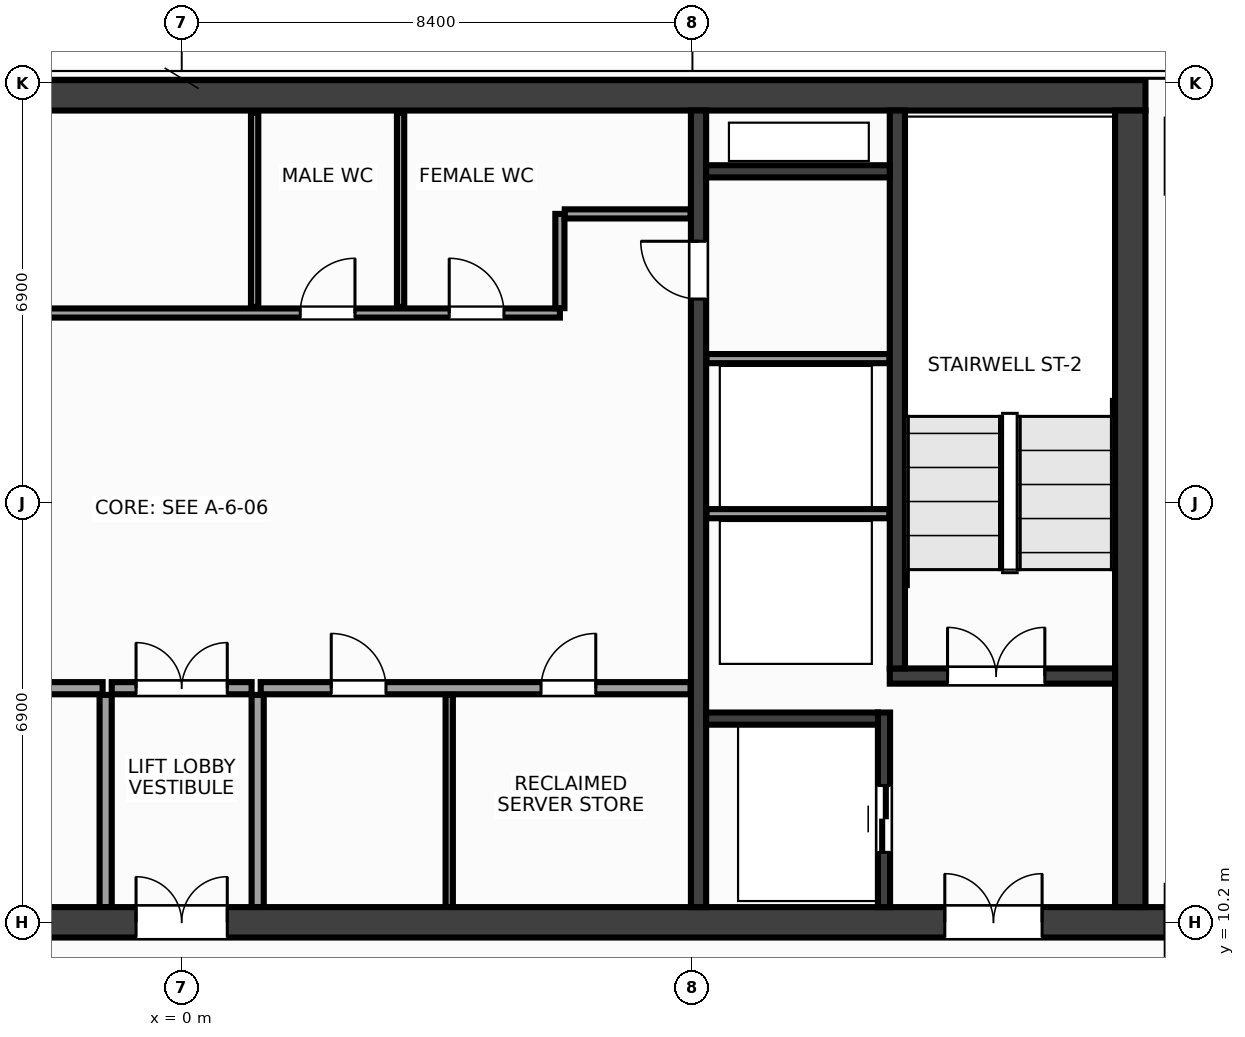
"""IFC4 building model, lengths in metres.
Left out: names, types, materials, properties, quantities, classifications, styles, units other than length and angle.
Written with IfcOpenShell. Run it as: python <this file> out.ifc"""

import sys

from ifc_helpers import new_model, si_unit, direction, frame, frame_2d, origin, place, context, subcontext, project, spatial, rectangle, extrude, source, transform, mapped, element, fill, save


model = new_model("IFC4")
c1 = context("Model", 3, precision=1e-05, world=origin(), true_north=direction((0.0, 1.0)))
c2 = subcontext(c1, "Body", "Model", "MODEL_VIEW")
j1 = project(units=[si_unit("LENGTHUNIT", "METRE"), si_unit("PLANEANGLEUNIT", "RADIAN")], contexts=[c1])
p1 = place(None, origin())
s1 = spatial("IfcSite", under=j1, at=p1, CompositionType="ELEMENT")
p2 = place(p1, origin())
s2 = spatial("IfcBuilding", under=s1, at=p2, CompositionType="ELEMENT")
p3 = place(p2, frame((0.0, 0.0, 282.8)))
s3 = spatial("IfcBuildingStorey", under=s2, at=p3, CompositionType="ELEMENT", Elevation=282.8)
m1 = source(origin(), c2, "Body", "SweptSolid", [
    extrude(rectangle(XDim=31.7, YDim=0.5, at=frame_2d((15.85, 0.0))), origin(), (0.0, 0.0, 1.0), 3.6),
])
p4 = place(p3, frame((-15.85, 23.8, 0.0), z_axis=(0.0, 0.0, 1.0), x_axis=(1.0, 0.0, 0.0)))
e1 = element("IfcWall", 1, at=p4, inside=s3, PredefinedType="SHEAR", context=c2, shape_type="MappedRepresentation", body=[
    mapped(m1, transform((0.0, 0.0, 0.0), x_axis=(1.0, 0.0, 0.0), y_axis=(0.0, 1.0, 0.0), z_axis=(0.0, 0.0, 1.0), scale=1.0)),
])
m2 = source(origin(), c2, "Body", "SweptSolid", [
    extrude(rectangle(XDim=32.4, YDim=0.5, at=frame_2d((16.2, 0.0))), origin(), (0.0, 0.0, 1.0), 3.6),
])
p5 = place(p3, frame((-16.2, 10.2, 0.0), z_axis=(0.0, 0.0, 1.0), x_axis=(1.0, 0.0, 0.0)))
e2 = element("IfcWall", 2, at=p5, inside=s3, PredefinedType="SHEAR", context=c2, shape_type="MappedRepresentation", body=[
    mapped(m2, transform((0.0, 0.0, 0.0), x_axis=(1.0, 0.0, 0.0), y_axis=(0.0, 1.0, 0.0), z_axis=(0.0, 0.0, 1.0), scale=1.0)),
])
p6 = place(p5, frame((2.05, 0.0, 0.0)))
e3 = element("IfcOpeningElement", 3, at=p6, cuts=e2, PredefinedType="OPENING", context=c2, shape_type="SweptSolid", body=[
    extrude(rectangle(XDim=1.6, YDim=2.15, at=frame_2d((0.8, 1.075))), frame((0.0, 0.262, 0.0), z_axis=(0.0, -1.0, 0.0), x_axis=(1.0, 0.0, 0.0)), (0.0, 0.0, 1.0), 0.524),
])
p7 = place(p5, frame((28.75, 0.0, 0.0)))
e4 = element("IfcOpeningElement", 4, at=p7, cuts=e2, PredefinedType="OPENING", context=c2, shape_type="SweptSolid", body=[
    extrude(rectangle(XDim=1.6, YDim=2.15, at=frame_2d((0.8, 1.075))), frame((0.0, 0.262, 0.0), z_axis=(0.0, -1.0, 0.0), x_axis=(1.0, 0.0, 0.0)), (0.0, 0.0, 1.0), 0.524),
])
p8 = place(p5, frame((15.45, 0.0, 0.0)))
e5 = element("IfcOpeningElement", 5, at=p8, cuts=e2, PredefinedType="OPENING", context=c2, shape_type="SweptSolid", body=[
    extrude(rectangle(XDim=1.5, YDim=2.2, at=frame_2d((0.75, 1.1))), frame((0.0, 0.262, 0.0), z_axis=(0.0, -1.0, 0.0), x_axis=(1.0, 0.0, 0.0)), (0.0, 0.0, 1.0), 0.524),
])
m3 = source(origin(), c2, "Body", "SweptSolid", [
    extrude(rectangle(XDim=13.1, YDim=0.5, at=frame_2d((6.55, 0.0))), origin(), (0.0, 0.0, 1.0), 3.6),
])
p9 = place(p3, frame((15.6, 10.45, 0.0), z_axis=(0.0, 0.0, 1.0), x_axis=(0.0, 1.0, 0.0)))
e6 = element("IfcWall", 6, at=p9, inside=s3, PredefinedType="SHEAR", context=c2, shape_type="MappedRepresentation", body=[
    mapped(m3, transform((0.0, 0.0, 0.0), x_axis=(1.0, 0.0, 0.0), y_axis=(0.0, 1.0, 0.0), z_axis=(0.0, 0.0, 1.0), scale=1.0)),
])
m4 = source(origin(), c2, "Body", "SweptSolid", [
    extrude(rectangle(XDim=13.1, YDim=0.25, at=frame_2d((6.55, 0.0))), origin(), (0.0, 0.0, 1.0), 3.6),
])
p10 = place(p3, frame((8.5, 10.45, 0.0), z_axis=(0.0, 0.0, 1.0), x_axis=(0.0, 1.0, 0.0)))
e7 = element("IfcWall", 7, at=p10, inside=s3, PredefinedType="SHEAR", context=c2, shape_type="MappedRepresentation", body=[
    mapped(m4, transform((0.0, 0.0, 0.0), x_axis=(1.0, 0.0, 0.0), y_axis=(0.0, 1.0, 0.0), z_axis=(0.0, 0.0, 1.0), scale=1.0)),
])
p11 = place(p10, frame((10.0, 0.0, 0.0)))
e8 = element("IfcOpeningElement", 8, at=p11, cuts=e7, PredefinedType="OPENING", context=c2, shape_type="SweptSolid", body=[
    extrude(rectangle(XDim=0.95, YDim=2.15, at=frame_2d((0.475, 1.075))), frame((0.0, 0.137, 0.0), z_axis=(0.0, -1.0, 0.0), x_axis=(1.0, 0.0, 0.0)), (0.0, 0.0, 1.0), 0.274),
])
m5 = source(origin(), c2, "Body", "SweptSolid", [
    extrude(rectangle(XDim=3.705, YDim=0.25, at=frame_2d((1.853, 0.0))), origin(), (0.0, 0.0, 1.0), 3.6),
])
p12 = place(p3, frame((11.645, 14.25, 0.0), z_axis=(0.0, 0.0, 1.0), x_axis=(1.0, 0.0, 0.0)))
e9 = element("IfcWall", 9, at=p12, inside=s3, PredefinedType="SHEAR", context=c2, shape_type="MappedRepresentation", body=[
    mapped(m5, transform((0.0, 0.0, 0.0), x_axis=(1.0, 0.0, 0.0), y_axis=(0.0, 1.0, 0.0), z_axis=(0.0, 0.0, 1.0), scale=1.0)),
])
p13 = place(p12, frame((0.95, 0.0, 0.0)))
e10 = element("IfcOpeningElement", 10, at=p13, cuts=e9, PredefinedType="OPENING", context=c2, shape_type="SweptSolid", body=[
    extrude(rectangle(XDim=1.6, YDim=2.15, at=frame_2d((0.8, 1.075))), frame((0.0, 0.137, 0.0), z_axis=(0.0, -1.0, 0.0), x_axis=(1.0, 0.0, 0.0)), (0.0, 0.0, 1.0), 0.274),
])
m6 = source(origin(), c2, "Body", "SweptSolid", [
    extrude(rectangle(XDim=9.175, YDim=0.25, at=frame_2d((4.587, 0.0))), origin(), (0.0, 0.0, 1.0), 3.6),
])
p14 = place(p3, frame((11.77, 14.375, 0.0), z_axis=(0.0, 0.0, 1.0), x_axis=(0.0, 1.0, 0.0)))
e11 = element("IfcWall", 11, at=p14, inside=s3, PredefinedType="SHEAR", context=c2, shape_type="MappedRepresentation", body=[
    mapped(m6, transform((0.0, 0.0, 0.0), x_axis=(1.0, 0.0, 0.0), y_axis=(0.0, 1.0, 0.0), z_axis=(0.0, 0.0, 1.0), scale=1.0)),
])
m7 = source(origin(), c2, "Body", "SweptSolid", [
    extrude(rectangle(XDim=3.2, YDim=0.2, at=frame_2d((1.6, 0.0))), origin(), (0.0, 0.0, 1.0), 3.6),
])
p15 = place(p3, frame((11.55, 10.45, 0.0), z_axis=(0.0, 0.0, 1.0), x_axis=(0.0, 1.0, 0.0)))
e12 = element("IfcWall", 12, at=p15, inside=s3, PredefinedType="SHEAR", context=c2, shape_type="MappedRepresentation", body=[
    mapped(m7, transform((0.0, 0.0, 0.0), x_axis=(1.0, 0.0, 0.0), y_axis=(0.0, 1.0, 0.0), z_axis=(0.0, 0.0, 1.0), scale=1.0)),
])
p16 = place(p15, frame((0.9, 0.0, 0.0)))
e13 = element("IfcOpeningElement", 13, at=p16, cuts=e12, PredefinedType="OPENING", context=c2, shape_type="SweptSolid", body=[
    extrude(rectangle(XDim=1.1, YDim=2.15, at=frame_2d((0.55, 1.075))), frame((0.0, 0.112, 0.0), z_axis=(0.0, -1.0, 0.0), x_axis=(1.0, 0.0, 0.0)), (0.0, 0.0, 1.0), 0.224),
])
m8 = source(origin(), c2, "Body", "SweptSolid", [
    extrude(rectangle(XDim=2.825, YDim=0.2, at=frame_2d((1.413, 0.0))), origin(), (0.0, 0.0, 1.0), 3.6),
])
p17 = place(p3, frame((8.625, 13.55, 0.0), z_axis=(0.0, 0.0, 1.0), x_axis=(1.0, 0.0, 0.0)))
e14 = element("IfcWall", 14, at=p17, inside=s3, PredefinedType="SHEAR", context=c2, shape_type="MappedRepresentation", body=[
    mapped(m8, transform((0.0, 0.0, 0.0), x_axis=(1.0, 0.0, 0.0), y_axis=(0.0, 1.0, 0.0), z_axis=(0.0, 0.0, 1.0), scale=1.0)),
])
m9 = source(origin(), c2, "Body", "SweptSolid", [
    extrude(rectangle(XDim=3.02, YDim=0.2, at=frame_2d((1.51, 0.0))), origin(), (0.0, 0.0, 1.0), 3.6),
])
p18 = place(p3, frame((8.625, 22.55, 0.0), z_axis=(0.0, 0.0, 1.0), x_axis=(1.0, 0.0, 0.0)))
e15 = element("IfcWall", 15, at=p18, inside=s3, PredefinedType="SHEAR", context=c2, shape_type="MappedRepresentation", body=[
    mapped(m9, transform((0.0, 0.0, 0.0), x_axis=(1.0, 0.0, 0.0), y_axis=(0.0, 1.0, 0.0), z_axis=(0.0, 0.0, 1.0), scale=1.0)),
])
m10 = source(origin(), c2, "Body", "SweptSolid", [
    extrude(rectangle(XDim=3.01, YDim=0.15, at=frame_2d((1.505, 0.0))), origin(), (0.0, 0.0, 1.0), 3.37),
])
for number, where, z_axis, x_axis in (
    (16, (8.63, 16.92, 0.0), (0.0, 0.0, 1.0), (1.0, 0.0, 0.0)),
    (17, (8.63, 19.47, 0.0), (0.0, 0.0, 1.0), (1.0, 0.0, 0.0)),
):
    element("IfcWall", number, at=place(p3, frame(where, z_axis=z_axis, x_axis=x_axis)), inside=s3, PredefinedType="PARTITIONING", context=c2, shape_type="MappedRepresentation", body=[
        mapped(m10, transform((0.0, 0.0, 0.0), x_axis=(1.0, 0.0, 0.0), y_axis=(0.0, 1.0, 0.0), z_axis=(0.0, 0.0, 1.0), scale=1.0)),
    ])
m11 = source(origin(), c2, "Body", "SweptSolid", [
    extrude(rectangle(XDim=7.07, YDim=0.2, at=frame_2d((3.535, 0.0))), origin(), (0.0, 0.0, 1.0), 3.37),
])
p19 = place(p3, frame((-8.37, 14.05, 0.0), z_axis=(0.0, 0.0, 1.0), x_axis=(1.0, 0.0, 0.0)))
e18 = element("IfcWall", 18, at=p19, inside=s3, PredefinedType="PARTITIONING", context=c2, shape_type="MappedRepresentation", body=[
    mapped(m11, transform((0.0, 0.0, 0.0), x_axis=(1.0, 0.0, 0.0), y_axis=(0.0, 1.0, 0.0), z_axis=(0.0, 0.0, 1.0), scale=1.0)),
])
p20 = place(p19, frame((2.8, 0.0, 0.0)))
e19 = element("IfcOpeningElement", 19, at=p20, cuts=e18, PredefinedType="OPENING", context=c2, shape_type="SweptSolid", body=[
    extrude(rectangle(XDim=0.98, YDim=2.15, at=frame_2d((0.49, 1.075))), frame((0.0, 0.112, 0.0), z_axis=(0.0, -1.0, 0.0), x_axis=(1.0, 0.0, 0.0)), (0.0, 0.0, 1.0), 0.224),
])
p21 = place(p3, frame((1.3, 14.05, 0.0), z_axis=(0.0, 0.0, 1.0), x_axis=(1.0, 0.0, 0.0)))
e20 = element("IfcWall", 20, at=p21, inside=s3, PredefinedType="PARTITIONING", context=c2, shape_type="MappedRepresentation", body=[
    mapped(m11, transform((0.0, 0.0, 0.0), x_axis=(1.0, 0.0, 0.0), y_axis=(0.0, 1.0, 0.0), z_axis=(0.0, 0.0, 1.0), scale=1.0)),
])
p22 = place(p21, frame((1.16, 0.0, 0.0)))
e21 = element("IfcOpeningElement", 21, at=p22, cuts=e20, PredefinedType="OPENING", context=c2, shape_type="SweptSolid", body=[
    extrude(rectangle(XDim=0.9, YDim=2.15, at=frame_2d((0.45, 1.075))), frame((0.0, 0.112, 0.0), z_axis=(0.0, -1.0, 0.0), x_axis=(1.0, 0.0, 0.0)), (0.0, 0.0, 1.0), 0.224),
])
p23 = place(p21, frame((4.61, 0.0, 0.0)))
e22 = element("IfcOpeningElement", 22, at=p23, cuts=e20, PredefinedType="OPENING", context=c2, shape_type="SweptSolid", body=[
    extrude(rectangle(XDim=0.9, YDim=2.15, at=frame_2d((0.45, 1.075))), frame((0.0, 0.112, 0.0), z_axis=(0.0, -1.0, 0.0), x_axis=(1.0, 0.0, 0.0)), (0.0, 0.0, 1.0), 0.224),
])
m12 = source(origin(), c2, "Body", "SweptSolid", [
    extrude(rectangle(XDim=3.49, YDim=0.2, at=frame_2d((1.745, 0.0))), origin(), (0.0, 0.0, 1.0), 3.37),
])
for number, where, z_axis, x_axis in (
    (23, (-1.25, 10.45, 0.0), (0.0, 0.0, 1.0), (0.0, 1.0, 0.0)),
    (24, (1.25, 10.45, 0.0), (0.0, 0.0, 1.0), (0.0, 1.0, 0.0)),
):
    element("IfcWall", number, at=place(p3, frame(where, z_axis=z_axis, x_axis=x_axis)), inside=s3, PredefinedType="PARTITIONING", context=c2, shape_type="MappedRepresentation", body=[
        mapped(m12, transform((0.0, 0.0, 0.0), x_axis=(1.0, 0.0, 0.0), y_axis=(0.0, 1.0, 0.0), z_axis=(0.0, 0.0, 1.0), scale=1.0)),
    ])
m13 = source(origin(), c2, "Body", "SweptSolid", [
    extrude(rectangle(XDim=2.3, YDim=0.2, at=frame_2d((1.15, 0.0))), origin(), (0.0, 0.0, 1.0), 3.37),
])
p24 = place(p3, frame((-1.15, 14.05, 0.0), z_axis=(0.0, 0.0, 1.0), x_axis=(1.0, 0.0, 0.0)))
e25 = element("IfcWall", 25, at=p24, inside=s3, PredefinedType="PARTITIONING", context=c2, shape_type="MappedRepresentation", body=[
    mapped(m13, transform((0.0, 0.0, 0.0), x_axis=(1.0, 0.0, 0.0), y_axis=(0.0, 1.0, 0.0), z_axis=(0.0, 0.0, 1.0), scale=1.0)),
])
p25 = place(p24, frame((0.4, 0.0, 0.0)))
e26 = element("IfcOpeningElement", 26, at=p25, cuts=e25, PredefinedType="OPENING", context=c2, shape_type="SweptSolid", body=[
    extrude(rectangle(XDim=1.5, YDim=2.2, at=frame_2d((0.75, 1.1))), frame((0.0, 0.112, 0.0), z_axis=(0.0, -1.0, 0.0), x_axis=(1.0, 0.0, 0.0)), (0.0, 0.0, 1.0), 0.224),
])
m14 = source(origin(), c2, "Body", "SweptSolid", [
    extrude(rectangle(XDim=14.59, YDim=0.15, at=frame_2d((7.295, 0.0))), origin(), (0.0, 0.0, 1.0), 3.37),
])
p26 = place(p3, frame((-8.37, 20.22, 0.0), z_axis=(0.0, 0.0, 1.0), x_axis=(1.0, 0.0, 0.0)))
e27 = element("IfcWall", 27, at=p26, inside=s3, PredefinedType="PARTITIONING", context=c2, shape_type="MappedRepresentation", body=[
    mapped(m14, transform((0.0, 0.0, 0.0), x_axis=(1.0, 0.0, 0.0), y_axis=(0.0, 1.0, 0.0), z_axis=(0.0, 0.0, 1.0), scale=1.0)),
])
p27 = place(p26, frame((4.36, 0.0, 0.0)))
e28 = element("IfcOpeningElement", 28, at=p27, cuts=e27, PredefinedType="OPENING", context=c2, shape_type="SweptSolid", body=[
    extrude(rectangle(XDim=0.9, YDim=2.15, at=frame_2d((0.45, 1.075))), frame((0.0, 0.087, 0.0), z_axis=(0.0, -1.0, 0.0), x_axis=(1.0, 0.0, 0.0)), (0.0, 0.0, 1.0), 0.174),
])
p28 = place(p26, frame((10.32, 0.0, 0.0)))
e29 = element("IfcOpeningElement", 29, at=p28, cuts=e27, PredefinedType="OPENING", context=c2, shape_type="SweptSolid", body=[
    extrude(rectangle(XDim=0.9, YDim=2.15, at=frame_2d((0.45, 1.075))), frame((0.0, 0.087, 0.0), z_axis=(0.0, -1.0, 0.0), x_axis=(1.0, 0.0, 0.0)), (0.0, 0.0, 1.0), 0.174),
])
p29 = place(p26, frame((12.77, 0.0, 0.0)))
e30 = element("IfcOpeningElement", 30, at=p29, cuts=e27, PredefinedType="OPENING", context=c2, shape_type="SweptSolid", body=[
    extrude(rectangle(XDim=0.9, YDim=2.15, at=frame_2d((0.45, 1.075))), frame((0.0, 0.087, 0.0), z_axis=(0.0, -1.0, 0.0), x_axis=(1.0, 0.0, 0.0)), (0.0, 0.0, 1.0), 0.174),
])
m15 = source(origin(), c2, "Body", "SweptSolid", [
    extrude(rectangle(XDim=1.55, YDim=0.15, at=frame_2d((0.775, 0.0))), origin(), (0.0, 0.0, 1.0), 3.37),
])
p30 = place(p3, frame((6.22, 20.3, 0.0), z_axis=(0.0, 0.0, 1.0), x_axis=(0.0, 1.0, 0.0)))
e31 = element("IfcWall", 31, at=p30, inside=s3, PredefinedType="PARTITIONING", context=c2, shape_type="MappedRepresentation", body=[
    mapped(m15, transform((0.0, 0.0, 0.0), x_axis=(1.0, 0.0, 0.0), y_axis=(0.0, 1.0, 0.0), z_axis=(0.0, 0.0, 1.0), scale=1.0)),
])
m16 = source(origin(), c2, "Body", "SweptSolid", [
    extrude(rectangle(XDim=2.07, YDim=0.15, at=frame_2d((1.035, 0.0))), origin(), (0.0, 0.0, 1.0), 3.37),
])
p31 = place(p3, frame((6.3, 21.85, 0.0), z_axis=(0.0, 0.0, 1.0), x_axis=(1.0, 0.0, 0.0)))
e32 = element("IfcWall", 32, at=p31, inside=s3, PredefinedType="PARTITIONING", context=c2, shape_type="MappedRepresentation", body=[
    mapped(m16, transform((0.0, 0.0, 0.0), x_axis=(1.0, 0.0, 0.0), y_axis=(0.0, 1.0, 0.0), z_axis=(0.0, 0.0, 1.0), scale=1.0)),
])
m17 = source(origin(), c2, "Body", "SweptSolid", [
    extrude(rectangle(XDim=3.49, YDim=0.12, at=frame_2d((1.745, 0.0))), origin(), (0.0, 0.0, 1.0), 3.37),
])
p32 = place(p3, frame((4.4, 10.45, 0.0), z_axis=(0.0, 0.0, 1.0), x_axis=(0.0, 1.0, 0.0)))
e33 = element("IfcWall", 33, at=p32, inside=s3, PredefinedType="PARTITIONING", context=c2, shape_type="MappedRepresentation", body=[
    mapped(m17, transform((0.0, 0.0, 0.0), x_axis=(1.0, 0.0, 0.0), y_axis=(0.0, 1.0, 0.0), z_axis=(0.0, 0.0, 1.0), scale=1.0)),
])
m18 = source(origin(), c2, "Body", "SweptSolid", [
    extrude(rectangle(XDim=3.19, YDim=0.12, at=frame_2d((1.595, 0.0))), origin(), (0.0, 0.0, 1.0), 3.37),
])
for number, where, z_axis, x_axis in (
    (34, (1.2, 20.32, 0.0), (0.0, 0.0, 1.0), (0.0, 1.0, 0.0)),
    (35, (3.6, 20.32, 0.0), (0.0, 0.0, 1.0), (0.0, 1.0, 0.0)),
):
    element("IfcWall", number, at=place(p3, frame(where, z_axis=z_axis, x_axis=x_axis)), inside=s3, PredefinedType="PARTITIONING", context=c2, shape_type="MappedRepresentation", body=[
        mapped(m18, transform((0.0, 0.0, 0.0), x_axis=(1.0, 0.0, 0.0), y_axis=(0.0, 1.0, 0.0), z_axis=(0.0, 0.0, 1.0), scale=1.0)),
    ])
m19 = source(origin(), c2, "Body", "SweptSolid", [
    extrude(rectangle(XDim=1.6, YDim=2.15, at=frame_2d((0.8, 1.075))), frame((0.0, 0.025, 0.0), z_axis=(0.0, -1.0, 0.0), x_axis=(1.0, 0.0, 0.0)), (0.0, 0.0, 1.0), 0.05),
])
p33 = place(p13, origin())
e36 = element("IfcDoor", 36, at=p33, inside=s3, OperationType="DOUBLE_DOOR_SINGLE_SWING", PredefinedType="DOOR", context=c2, shape_type="MappedRepresentation", body=[
    mapped(m19, transform((0.0, 0.0, 0.0), x_axis=(1.0, 0.0, 0.0), y_axis=(0.0, 1.0, 0.0), z_axis=(0.0, 0.0, 1.0), scale=1.0)),
])
fill(e10, e36)
p34 = place(p7, origin())
e37 = element("IfcDoor", 37, at=p34, inside=s3, OperationType="DOUBLE_DOOR_SINGLE_SWING", PredefinedType="DOOR", context=c2, shape_type="MappedRepresentation", body=[
    mapped(m19, transform((0.0, 0.0, 0.0), x_axis=(1.0, 0.0, 0.0), y_axis=(0.0, 1.0, 0.0), z_axis=(0.0, 0.0, 1.0), scale=1.0)),
])
fill(e4, e37)
m20 = source(origin(), c2, "Body", "SweptSolid", [
    extrude(rectangle(XDim=1.1, YDim=2.15, at=frame_2d((0.55, 1.075))), frame((0.0, 0.025, 0.0), z_axis=(0.0, -1.0, 0.0), x_axis=(1.0, 0.0, 0.0)), (0.0, 0.0, 1.0), 0.05),
])
p35 = place(p16, origin())
e38 = element("IfcDoor", 38, at=p35, inside=s3, OperationType="DOUBLE_DOOR_SLIDING", PredefinedType="DOOR", context=c2, shape_type="MappedRepresentation", body=[
    mapped(m20, transform((0.0, 0.0, 0.0), x_axis=(1.0, 0.0, 0.0), y_axis=(0.0, 1.0, 0.0), z_axis=(0.0, 0.0, 1.0), scale=1.0)),
])
fill(e13, e38)
m21 = source(origin(), c2, "Body", "SweptSolid", [
    extrude(rectangle(XDim=0.95, YDim=2.15, at=frame_2d((0.475, 1.075))), frame((0.0, 0.025, 0.0), z_axis=(0.0, -1.0, 0.0), x_axis=(1.0, 0.0, 0.0)), (0.0, 0.0, 1.0), 0.05),
])
p36 = place(p11, origin())
e39 = element("IfcDoor", 39, at=p36, inside=s3, OperationType="SINGLE_SWING_RIGHT", PredefinedType="DOOR", context=c2, shape_type="MappedRepresentation", body=[
    mapped(m21, transform((0.0, 0.0, 0.0), x_axis=(1.0, 0.0, 0.0), y_axis=(0.0, 1.0, 0.0), z_axis=(0.0, 0.0, 1.0), scale=1.0)),
])
fill(e8, e39)
m22 = source(origin(), c2, "Body", "SweptSolid", [
    extrude(rectangle(XDim=0.9, YDim=2.15, at=frame_2d((0.45, 1.075))), frame((0.0, 0.025, 0.0), z_axis=(0.0, -1.0, 0.0), x_axis=(1.0, 0.0, 0.0)), (0.0, 0.0, 1.0), 0.05),
])
p37 = place(p22, origin())
e40 = element("IfcDoor", 40, at=p37, inside=s3, OperationType="SINGLE_SWING_LEFT", PredefinedType="DOOR", context=c2, shape_type="MappedRepresentation", body=[
    mapped(m22, transform((0.0, 0.0, 0.0), x_axis=(1.0, 0.0, 0.0), y_axis=(0.0, 1.0, 0.0), z_axis=(0.0, 0.0, 1.0), scale=1.0)),
])
fill(e21, e40)
p38 = place(p23, origin())
e41 = element("IfcDoor", 41, at=p38, inside=s3, OperationType="SINGLE_SWING_RIGHT", PredefinedType="DOOR", context=c2, shape_type="MappedRepresentation", body=[
    mapped(m22, transform((0.0, 0.0, 0.0), x_axis=(1.0, 0.0, 0.0), y_axis=(0.0, 1.0, 0.0), z_axis=(0.0, 0.0, 1.0), scale=1.0)),
])
fill(e22, e41)
m23 = source(origin(), c2, "Body", "SweptSolid", [
    extrude(rectangle(XDim=1.5, YDim=2.2, at=frame_2d((0.75, 1.1))), frame((0.0, 0.025, 0.0), z_axis=(0.0, -1.0, 0.0), x_axis=(1.0, 0.0, 0.0)), (0.0, 0.0, 1.0), 0.05),
])
p39 = place(p25, origin())
e42 = element("IfcDoor", 42, at=p39, inside=s3, OperationType="DOUBLE_DOOR_SINGLE_SWING", PredefinedType="DOOR", context=c2, shape_type="MappedRepresentation", body=[
    mapped(m23, transform((0.0, 0.0, 0.0), x_axis=(1.0, 0.0, 0.0), y_axis=(0.0, 1.0, 0.0), z_axis=(0.0, 0.0, 1.0), scale=1.0)),
])
fill(e26, e42)
p40 = place(p8, origin())
e43 = element("IfcDoor", 43, at=p40, inside=s3, OperationType="DOUBLE_DOOR_SINGLE_SWING", PredefinedType="DOOR", context=c2, shape_type="MappedRepresentation", body=[
    mapped(m23, transform((0.0, 0.0, 0.0), x_axis=(1.0, 0.0, 0.0), y_axis=(0.0, 1.0, 0.0), z_axis=(0.0, 0.0, 1.0), scale=1.0)),
])
fill(e5, e43)
p41 = place(p28, origin())
e44 = element("IfcDoor", 44, at=p41, inside=s3, OperationType="SINGLE_SWING_RIGHT", PredefinedType="DOOR", context=c2, shape_type="MappedRepresentation", body=[
    mapped(m22, transform((0.0, 0.0, 0.0), x_axis=(1.0, 0.0, 0.0), y_axis=(0.0, 1.0, 0.0), z_axis=(0.0, 0.0, 1.0), scale=1.0)),
])
fill(e29, e44)
p42 = place(p29, origin())
e45 = element("IfcDoor", 45, at=p42, inside=s3, OperationType="SINGLE_SWING_LEFT", PredefinedType="DOOR", context=c2, shape_type="MappedRepresentation", body=[
    mapped(m22, transform((0.0, 0.0, 0.0), x_axis=(1.0, 0.0, 0.0), y_axis=(0.0, 1.0, 0.0), z_axis=(0.0, 0.0, 1.0), scale=1.0)),
])
fill(e30, e45)
save(model, sys.argv[1])
